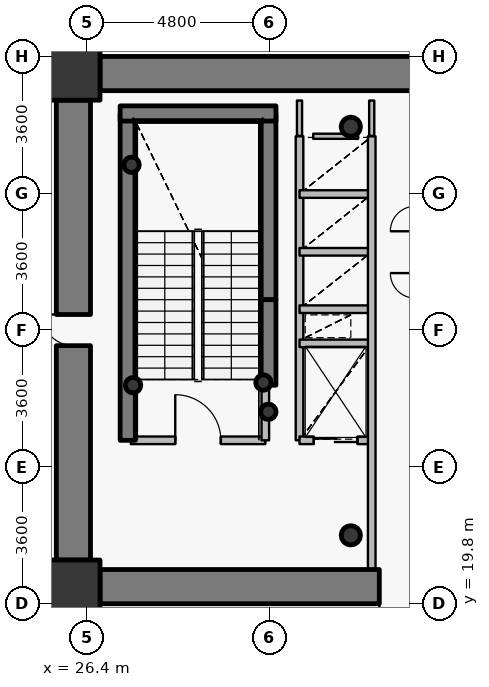
"""IFC4 building model, lengths in metres.
Left out: names, types, materials, properties, quantities, classifications, styles, units other than length and angle.
Written with IfcOpenShell. Run it as: python <this file> out.ifc"""

import sys

from ifc_helpers import new_model, si_unit, direction, frame, frame_2d, origin, origin_2d, place, context, subcontext, project, spatial, rectangle, hollow_circle, extrude, source, transform, mapped, element, fill, save


model = new_model("IFC4")
c1 = context("Model", 3, precision=1e-05, world=origin(), true_north=direction((0.0, 1.0)))
c2 = subcontext(c1, "Body", "Model", "MODEL_VIEW")
j1 = project(units=[si_unit("LENGTHUNIT", "METRE"), si_unit("PLANEANGLEUNIT", "RADIAN")], contexts=[c1])
p1 = place(None, origin())
s1 = spatial("IfcSite", under=j1, at=p1, CompositionType="ELEMENT")
p2 = place(p1, origin())
s2 = spatial("IfcBuilding", under=s1, at=p2, CompositionType="ELEMENT")
p3 = place(p2, frame((0.0, 0.0, 78.6)))
s3 = spatial("IfcBuildingStorey", under=s2, at=p3, CompositionType="ELEMENT", Elevation=78.6)
for number, where, z_axis, x_axis in (
    (1, (26.05, 20.25, 0.0), (0.0, 0.0, 1.0), (1.0, 0.0, 0.0)),
    (2, (26.05, 33.75, 0.0), (0.0, 0.0, 1.0), (1.0, 0.0, 0.0)),
):
    element("IfcColumn", number, at=place(p3, frame(where, z_axis=z_axis, x_axis=x_axis)), inside=s3, PredefinedType="COLUMN", context=c2, shape_type="SweptSolid", body=[
        extrude(rectangle(XDim=1.4, YDim=1.4, at=origin_2d()), origin(), (0.0, 0.0, 1.0), 4.2),
    ])
for number, where, z_axis, x_axis in (
    (3, (33.35, 21.6, 0.0), (0.0, 0.0, 1.0), (1.0, 0.0, 0.0)),
    (4, (33.35, 32.35, 0.0), (0.0, 0.0, 1.0), (1.0, 0.0, 0.0)),
):
    element("IfcColumn", number, at=place(p3, frame(where, z_axis=z_axis, x_axis=x_axis)), inside=s3, PredefinedType="COLUMN", context=c2, shape_type="SweptSolid", body=[
        extrude(hollow_circle(Radius=0.254, WallThickness=0.02, at=origin_2d()), origin(), (0.0, 0.0, 1.0), 4.2),
    ])
p4 = place(p3, frame((27.48, 24.1, 0.0), z_axis=(0.0, 0.0, 1.0), x_axis=(0.0, 1.0, 0.0)))
e5 = element("IfcWall", 5, at=p4, inside=s3, PredefinedType="SHEAR", context=c2, shape_type="SweptSolid", body=[
    extrude(rectangle(XDim=8.6, YDim=0.4, at=frame_2d((4.3, 0.0))), origin(), (0.0, 0.0, 1.0), 4.2),
])
p5 = place(p3, frame((31.18, 27.8, 0.0), z_axis=(0.0, 0.0, 1.0), x_axis=(0.0, 1.0, 0.0)))
e6 = element("IfcWall", 6, at=p5, inside=s3, PredefinedType="SHEAR", context=c2, shape_type="SweptSolid", body=[
    extrude(rectangle(XDim=4.9, YDim=0.4, at=frame_2d((2.45, 0.0))), origin(), (0.0, 0.0, 1.0), 4.2),
])
p6 = place(p3, frame((27.28, 32.7, 0.0), z_axis=(0.0, 0.0, 1.0), x_axis=(1.0, 0.0, 0.0)))
e7 = element("IfcWall", 7, at=p6, inside=s3, PredefinedType="SHEAR", context=c2, shape_type="SweptSolid", body=[
    extrude(rectangle(XDim=4.1, YDim=0.4, at=frame_2d((2.05, 0.0))), origin(), (0.0, 0.0, 1.0), 4.2),
])
for number, where, z_axis, x_axis in (
    (8, (27.58, 31.35, 0.0), (0.0, 0.0, 1.0), (1.0, 0.0, 0.0)),
    (9, (31.05, 25.62, 0.0), (0.0, 0.0, 1.0), (1.0, 0.0, 0.0)),
    (10, (31.18, 24.85, 0.0), (0.0, 0.0, 1.0), (1.0, 0.0, 0.0)),
    (11, (27.62, 25.55, 0.0), (0.0, 0.0, 1.0), (1.0, 0.0, 0.0)),
):
    element("IfcColumn", number, at=place(p3, frame(where, z_axis=z_axis, x_axis=x_axis)), inside=s3, PredefinedType="COLUMN", context=c2, shape_type="SweptSolid", body=[
        extrude(hollow_circle(Radius=0.203, WallThickness=0.016, at=origin_2d()), origin(), (0.0, 0.0, 1.0), 4.2),
    ])
p7 = place(p3, frame((26.75, 33.75, 0.0), z_axis=(0.0, 0.0, 1.0), x_axis=(1.0, 0.0, 0.0)))
e12 = element("IfcWall", 12, at=p7, inside=s3, PredefinedType="SHEAR", context=c2, shape_type="SweptSolid", body=[
    extrude(rectangle(XDim=18.5, YDim=0.9, at=frame_2d((9.25, 0.0))), origin(), (0.0, 0.0, 1.0), 3.4),
])
p8 = place(p3, frame((45.25, 20.25, 0.0), z_axis=(0.0, 0.0, 1.0), x_axis=(-1.0, 0.0, 0.0)))
e13 = element("IfcWall", 13, at=p8, inside=s3, PredefinedType="SHEAR", context=c2, shape_type="SweptSolid", body=[
    extrude(rectangle(XDim=18.5, YDim=0.9, at=frame_2d((9.25, 0.0))), origin(), (0.0, 0.0, 1.0), 3.4),
])
p9 = place(p8, frame((10.0, 0.0, 0.0)))
e14 = element("IfcOpeningElement", 14, at=p9, cuts=e13, PredefinedType="OPENING", context=c2, shape_type="SweptSolid", body=[
    extrude(rectangle(XDim=1.15, YDim=2.15, at=origin_2d()), frame((0.575, 0.46, 1.075), z_axis=(0.0, -1.0, 0.0), x_axis=(1.0, 0.0, 0.0)), (0.0, 0.0, 1.0), 0.92),
])
p10 = place(p3, frame((26.05, 20.95, 0.0), z_axis=(0.0, 0.0, 1.0), x_axis=(0.0, 1.0, 0.0)))
e15 = element("IfcWall", 15, at=p10, inside=s3, PredefinedType="SHEAR", context=c2, shape_type="SweptSolid", body=[
    extrude(rectangle(XDim=12.1, YDim=0.9, at=frame_2d((6.05, 0.0))), origin(), (0.0, 0.0, 1.0), 3.4),
])
p11 = place(p10, frame((5.64, 0.0, 0.0)))
e16 = element("IfcOpeningElement", 16, at=p11, cuts=e15, PredefinedType="OPENING", context=c2, shape_type="SweptSolid", body=[
    extrude(rectangle(XDim=0.82, YDim=2.1, at=origin_2d()), frame((0.41, 0.46, 1.05), z_axis=(0.0, -1.0, 0.0), x_axis=(1.0, 0.0, 0.0)), (0.0, 0.0, 1.0), 0.92),
])
p12 = place(p3, frame((31.18, 25.55, 0.0), z_axis=(0.0, 0.0, 1.0), x_axis=(0.0, 1.0, 0.0)))
e17 = element("IfcWall", 17, at=p12, inside=s3, PredefinedType="SHEAR", context=c2, shape_type="SweptSolid", body=[
    extrude(rectangle(XDim=2.25, YDim=0.4, at=frame_2d((1.125, 0.0))), origin(), (0.0, 0.0, 1.0), 3.55),
])
p13 = place(p3, frame((27.56, 24.1, 0.0), z_axis=(0.0, 0.0, 1.0), x_axis=(1.0, 0.0, 0.0)))
e18 = element("IfcWall", 18, at=p13, inside=s3, PredefinedType="PARTITIONING", context=c2, shape_type="SweptSolid", body=[
    extrude(rectangle(XDim=3.54, YDim=0.2, at=frame_2d((1.77, 0.0))), origin(), (0.0, 0.0, 1.0), 3.95),
])
p14 = place(p13, frame((1.17, 0.0, 0.0)))
e19 = element("IfcOpeningElement", 19, at=p14, cuts=e18, PredefinedType="OPENING", context=c2, shape_type="SweptSolid", body=[
    extrude(rectangle(XDim=1.2, YDim=2.15, at=origin_2d()), frame((0.6, 0.11, 1.075), z_axis=(0.0, -1.0, 0.0), x_axis=(1.0, 0.0, 0.0)), (0.0, 0.0, 1.0), 0.22),
])
p15 = place(p3, frame((31.1, 24.1, 0.0), z_axis=(0.0, 0.0, 1.0), x_axis=(0.0, 1.0, 0.0)))
e20 = element("IfcWall", 20, at=p15, inside=s3, PredefinedType="PARTITIONING", context=c2, shape_type="SweptSolid", body=[
    extrude(rectangle(XDim=1.44, YDim=0.2, at=frame_2d((0.72, 0.0))), origin(), (0.0, 0.0, 1.0), 3.95),
])
p16 = place(p3, frame((32.0, 24.1, 0.0), z_axis=(0.0, 0.0, 1.0), x_axis=(0.0, 1.0, 0.0)))
e21 = element("IfcWall", 21, at=p16, inside=s3, PredefinedType="PARTITIONING", context=c2, shape_type="SweptSolid", body=[
    extrude(rectangle(XDim=8.0, YDim=0.2, at=frame_2d((4.0, 0.0))), origin(), (0.0, 0.0, 1.0), 3.95),
])
p17 = place(p3, frame((32.0, 24.1, 0.0), z_axis=(0.0, 0.0, 1.0), x_axis=(1.0, 0.0, 0.0)))
e22 = element("IfcWall", 22, at=p17, inside=s3, PredefinedType="PARTITIONING", context=c2, shape_type="SweptSolid", body=[
    extrude(rectangle(XDim=1.9, YDim=0.2, at=frame_2d((0.95, 0.0))), origin(), (0.0, 0.0, 1.0), 3.535),
])
p18 = place(p17, frame((0.375, 0.0, 0.0)))
e23 = element("IfcOpeningElement", 23, at=p18, cuts=e22, PredefinedType="OPENING", context=c2, shape_type="SweptSolid", body=[
    extrude(rectangle(XDim=1.15, YDim=2.15, at=origin_2d()), frame((0.575, 0.11, 1.075), z_axis=(0.0, -1.0, 0.0), x_axis=(1.0, 0.0, 0.0)), (0.0, 0.0, 1.0), 0.22),
])
for number, where, z_axis, x_axis in (
    (24, (32.0, 26.65, 0.0), (0.0, 0.0, 1.0), (1.0, 0.0, 0.0)),
    (25, (32.0, 27.55, 0.0), (0.0, 0.0, 1.0), (1.0, 0.0, 0.0)),
    (26, (32.0, 29.06, 0.0), (0.0, 0.0, 1.0), (1.0, 0.0, 0.0)),
    (27, (32.0, 30.58, 0.0), (0.0, 0.0, 1.0), (1.0, 0.0, 0.0)),
):
    element("IfcWall", number, at=place(p3, frame(where, z_axis=z_axis, x_axis=x_axis)), inside=s3, PredefinedType="PARTITIONING", context=c2, shape_type="SweptSolid", body=[
        extrude(rectangle(XDim=1.9, YDim=0.2, at=frame_2d((0.95, 0.0))), origin(), (0.0, 0.0, 1.0), 3.535),
    ])
p19 = place(p3, frame((33.9, 20.7, 0.0), z_axis=(0.0, 0.0, 1.0), x_axis=(0.0, 1.0, 0.0)))
e28 = element("IfcWall", 28, at=p19, inside=s3, PredefinedType="PARTITIONING", context=c2, shape_type="SweptSolid", body=[
    extrude(rectangle(XDim=11.4, YDim=0.2, at=frame_2d((5.7, 0.0))), origin(), (0.0, 0.0, 1.0), 3.535),
])
p20 = place(p3, frame((32.36, 32.1, 0.0), z_axis=(0.0, 0.0, 1.0), x_axis=(1.0, 0.0, 0.0)))
e29 = element("IfcWall", 29, at=p20, inside=s3, PredefinedType="PARTITIONING", context=c2, shape_type="SweptSolid", body=[
    extrude(rectangle(XDim=1.18, YDim=0.135, at=frame_2d((0.59, 0.0))), origin(), (0.0, 0.0, 1.0), 3.535),
])
p21 = place(p3, frame((32.0, 33.04, 0.0), z_axis=(0.0, 0.0, 1.0), x_axis=(0.0, -1.0, 0.0)))
e30 = element("IfcWall", 30, at=p21, inside=s3, PredefinedType="PARTITIONING", context=c2, shape_type="SweptSolid", body=[
    extrude(rectangle(XDim=0.93, YDim=0.135, at=frame_2d((0.465, 0.0))), origin(), (0.0, 0.0, 1.0), 3.485),
])
p22 = place(p3, frame((33.9, 32.11, 0.0), z_axis=(0.0, 0.0, 1.0), x_axis=(0.0, 1.0, 0.0)))
e31 = element("IfcWall", 31, at=p22, inside=s3, PredefinedType="PARTITIONING", context=c2, shape_type="SweptSolid", body=[
    extrude(rectangle(XDim=0.93, YDim=0.135, at=frame_2d((0.465, 0.0))), origin(), (0.0, 0.0, 1.0), 3.535),
])
p23 = place(p3, frame((26.74, 34.2, 0.0), z_axis=(0.0, 0.0, 1.0), x_axis=(-1.0, 0.0, 0.0)))
e32 = element("IfcWall", 32, at=p23, inside=s3, PredefinedType="PARTITIONING", context=c2, shape_type="SweptSolid", body=[
    extrude(rectangle(XDim=1.14, YDim=0.135, at=frame_2d((0.57, 0.0))), origin(), (0.0, 0.0, 1.0), 3.285),
])
p24 = place(p3, frame((25.6, 33.893, 0.0), z_axis=(0.0, 0.0, 1.0), x_axis=(0.0, -1.0, 0.0)))
e33 = element("IfcWall", 33, at=p24, inside=s3, PredefinedType="PARTITIONING", context=c2, shape_type="SweptSolid", body=[
    extrude(rectangle(XDim=0.833, YDim=0.135, at=frame_2d((0.416, 0.0))), origin(), (0.0, 0.0, 1.0), 3.95),
])
p25 = place(p3, frame((25.6, 20.94, 0.0), z_axis=(0.0, 0.0, 1.0), x_axis=(0.0, -1.0, 0.0)))
e34 = element("IfcWall", 34, at=p25, inside=s3, PredefinedType="PARTITIONING", context=c2, shape_type="SweptSolid", body=[
    extrude(rectangle(XDim=1.14, YDim=0.135, at=frame_2d((0.57, 0.0))), origin(), (0.0, 0.0, 1.0), 3.95),
])
p26 = place(p3, frame((25.907, 19.8, 0.0), z_axis=(0.0, 0.0, 1.0), x_axis=(1.0, 0.0, 0.0)))
e35 = element("IfcWall", 35, at=p26, inside=s3, PredefinedType="PARTITIONING", context=c2, shape_type="SweptSolid", body=[
    extrude(rectangle(XDim=0.833, YDim=0.135, at=frame_2d((0.416, 0.0))), origin(), (0.0, 0.0, 1.0), 3.285),
])
m1 = source(origin(), c2, "Body", "SweptSolid", [
    extrude(rectangle(XDim=0.82, YDim=2.1, at=origin_2d()), frame((0.41, 0.025, 1.05), z_axis=(0.0, -1.0, 0.0), x_axis=(1.0, 0.0, 0.0)), (0.0, 0.0, 1.0), 0.05),
])
p27 = place(p11, origin())
e36 = element("IfcDoor", 36, at=p27, inside=s3, OperationType="SINGLE_SWING_RIGHT", PredefinedType="DOOR", context=c2, shape_type="MappedRepresentation", body=[
    mapped(m1, transform((0.0, 0.0, 0.0), x_axis=(1.0, 0.0, 0.0), y_axis=(0.0, 1.0, 0.0), z_axis=(0.0, 0.0, 1.0), scale=1.0)),
])
fill(e16, e36)
m2 = source(origin(), c2, "Body", "SweptSolid", [
    extrude(rectangle(XDim=1.15, YDim=2.15, at=origin_2d()), frame((0.575, 0.025, 1.075), z_axis=(0.0, -1.0, 0.0), x_axis=(1.0, 0.0, 0.0)), (0.0, 0.0, 1.0), 0.05),
])
p28 = place(p9, origin())
e37 = element("IfcDoor", 37, at=p28, inside=s3, OperationType="SINGLE_SWING_RIGHT", PredefinedType="DOOR", context=c2, shape_type="MappedRepresentation", body=[
    mapped(m2, transform((0.0, 0.0, 0.0), x_axis=(1.0, 0.0, 0.0), y_axis=(0.0, 1.0, 0.0), z_axis=(0.0, 0.0, 1.0), scale=1.0)),
])
fill(e14, e37)
m3 = source(origin(), c2, "Body", "SweptSolid", [
    extrude(rectangle(XDim=1.2, YDim=2.15, at=origin_2d()), frame((0.6, 0.025, 1.075), z_axis=(0.0, -1.0, 0.0), x_axis=(1.0, 0.0, 0.0)), (0.0, 0.0, 1.0), 0.05),
])
p29 = place(p14, origin())
e38 = element("IfcDoor", 38, at=p29, inside=s3, OperationType="SINGLE_SWING_LEFT", PredefinedType="DOOR", context=c2, shape_type="MappedRepresentation", body=[
    mapped(m3, transform((0.0, 0.0, 0.0), x_axis=(1.0, 0.0, 0.0), y_axis=(0.0, 1.0, 0.0), z_axis=(0.0, 0.0, 1.0), scale=1.0)),
])
fill(e19, e38)
m4 = source(origin(), c2, "Body", "SweptSolid", [
    extrude(rectangle(XDim=1.15, YDim=2.15, at=origin_2d()), frame((0.575, 0.025, 1.075), z_axis=(0.0, -1.0, 0.0), x_axis=(1.0, 0.0, 0.0)), (0.0, 0.0, 1.0), 0.05),
])
p30 = place(p18, origin())
e39 = element("IfcDoor", 39, at=p30, inside=s3, OperationType="DOUBLE_DOOR_SLIDING", PredefinedType="USERDEFINED", context=c2, shape_type="MappedRepresentation", body=[
    mapped(m4, transform((0.0, 0.0, 0.0), x_axis=(1.0, 0.0, 0.0), y_axis=(0.0, 1.0, 0.0), z_axis=(0.0, 0.0, 1.0), scale=1.0)),
])
fill(e23, e39)
save(model, sys.argv[1])
